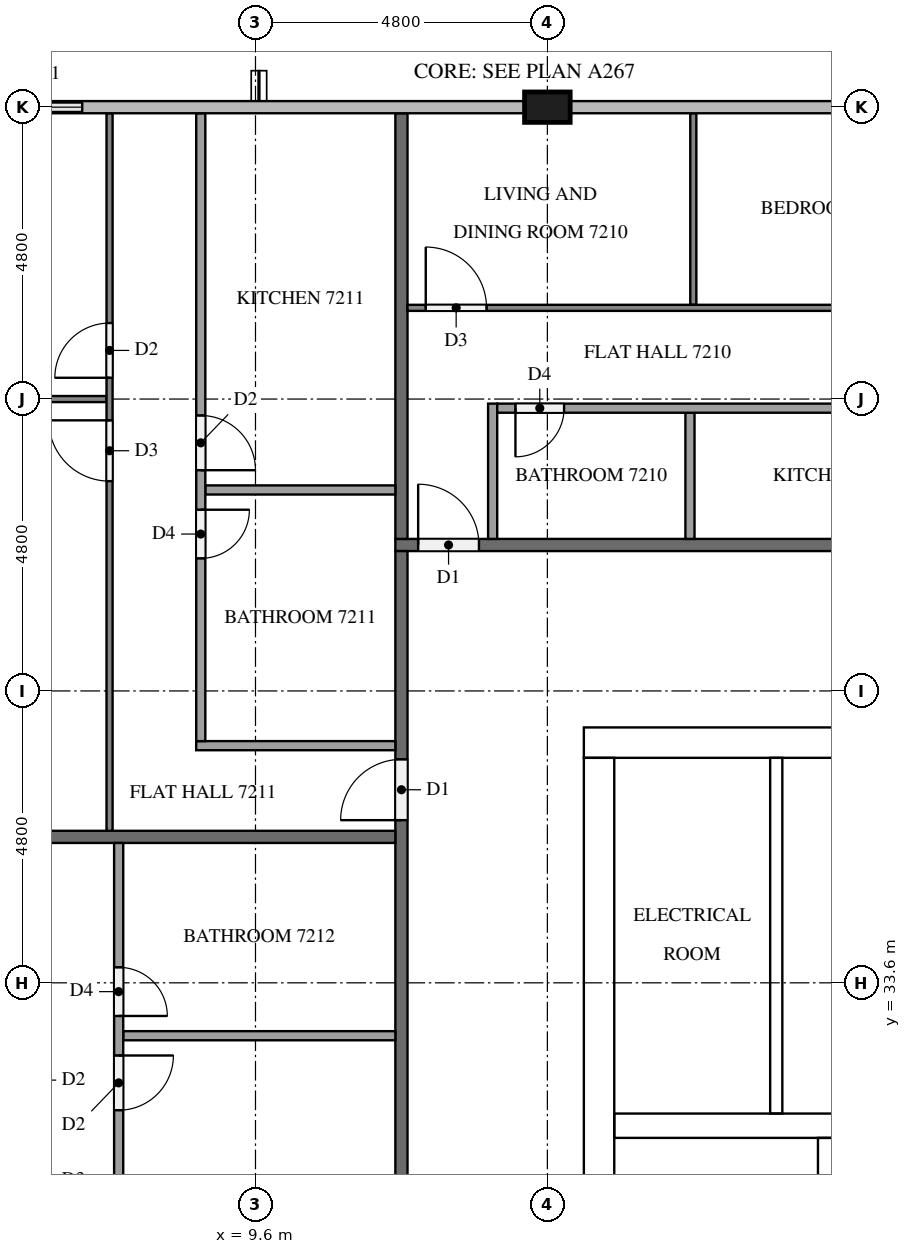
"""IFC4 building model, lengths in metres.
Left out: names, types, materials, properties, quantities, classifications, styles, units other than length and angle.
Written with IfcOpenShell. Run it as: python <this file> out.ifc"""

import sys

from ifc_helpers import new_model, si_unit, direction, frame, frame_2d, origin, origin_2d, place, context, subcontext, project, spatial, rectangle, extrude, element, fill, save


model = new_model("IFC4")
c1 = context("Model", 3, precision=1e-05, world=origin(), true_north=direction((0.0, 1.0)))
c2 = subcontext(c1, "Body", "Model", "MODEL_VIEW")
j1 = project(units=[si_unit("LENGTHUNIT", "METRE"), si_unit("PLANEANGLEUNIT", "RADIAN")], contexts=[c1])
p1 = place(None, origin())
s1 = spatial("IfcSite", under=j1, at=p1, CompositionType="ELEMENT")
p2 = place(p1, origin())
s2 = spatial("IfcBuilding", under=s1, at=p2, CompositionType="ELEMENT")
p3 = place(p2, frame((0.0, 0.0, 275.6)))
s3 = spatial("IfcBuildingStorey", under=s2, at=p3, CompositionType="ELEMENT", Elevation=275.6)
p4 = place(p3, frame((15.0, 37.55, 0.0), z_axis=(0.0, 0.0, 1.0), x_axis=(1.0, 0.0, 0.0)))
e1 = element("IfcWall", 1, at=p4, inside=s3, PredefinedType="SHEAR", context=c2, shape_type="SweptSolid", body=[
    extrude(rectangle(XDim=32.4, YDim=0.5, at=frame_2d((16.2, 0.0))), origin(), (0.0, 0.0, 1.0), 3.2),
])
p5 = place(p4, frame((15.3, 0.0, 0.0)))
e2 = element("IfcOpeningElement", 2, at=p5, cuts=e1, PredefinedType="OPENING", context=c2, shape_type="SweptSolid", body=[
    extrude(rectangle(XDim=1.8, YDim=2.1, at=frame_2d((0.9, 1.05))), frame((0.0, 0.26, 0.0), z_axis=(0.0, -1.0, 0.0), x_axis=(1.0, 0.0, 0.0)), (0.0, 0.0, 1.0), 0.52),
])
p6 = place(p4, frame((1.282, 0.0, 0.0)))
e3 = element("IfcOpeningElement", 3, at=p6, cuts=e1, PredefinedType="OPENING", context=c2, shape_type="SweptSolid", body=[
    extrude(rectangle(XDim=1.0, YDim=2.1, at=frame_2d((0.5, 1.05))), frame((0.0, 0.26, 0.0), z_axis=(0.0, -1.0, 0.0), x_axis=(1.0, 0.0, 0.0)), (0.0, 0.0, 1.0), 0.52),
])
p7 = place(p4, frame((5.082, 0.0, 0.0)))
e4 = element("IfcOpeningElement", 4, at=p7, cuts=e1, PredefinedType="OPENING", context=c2, shape_type="SweptSolid", body=[
    extrude(rectangle(XDim=1.0, YDim=2.1, at=frame_2d((0.5, 1.05))), frame((0.0, 0.26, 0.0), z_axis=(0.0, -1.0, 0.0), x_axis=(1.0, 0.0, 0.0)), (0.0, 0.0, 1.0), 0.52),
])
p8 = place(p3, frame((15.25, 15.5, 0.0), z_axis=(0.0, 0.0, 1.0), x_axis=(0.0, 1.0, 0.0)))
e5 = element("IfcWall", 5, at=p8, inside=s3, PredefinedType="SHEAR", context=c2, shape_type="SweptSolid", body=[
    extrude(rectangle(XDim=21.8, YDim=0.5, at=frame_2d((10.9, 0.0))), origin(), (0.0, 0.0, 1.0), 3.2),
])
p9 = place(p8, frame((5.26, 0.0, 0.0)))
e6 = element("IfcOpeningElement", 6, at=p9, cuts=e5, PredefinedType="OPENING", context=c2, shape_type="SweptSolid", body=[
    extrude(rectangle(XDim=1.2, YDim=2.1, at=frame_2d((0.6, 1.05))), frame((0.0, 0.26, 0.0), z_axis=(0.0, -1.0, 0.0), x_axis=(1.0, 0.0, 0.0)), (0.0, 0.0, 1.0), 0.52),
])
p10 = place(p3, frame((19.05, 15.5, 0.0), z_axis=(0.0, 0.0, 1.0), x_axis=(0.0, 1.0, 0.0)))
e7 = element("IfcWall", 7, at=p10, inside=s3, PredefinedType="SHEAR", context=c2, shape_type="SweptSolid", body=[
    extrude(rectangle(XDim=15.55, YDim=0.4, at=frame_2d((7.775, 0.0))), origin(), (0.0, 0.0, 1.0), 3.2),
])
p11 = place(p10, frame((9.95, 0.0, 0.0)))
e8 = element("IfcOpeningElement", 8, at=p11, cuts=e7, PredefinedType="OPENING", context=c2, shape_type="SweptSolid", body=[
    extrude(rectangle(XDim=1.1, YDim=2.1, at=frame_2d((0.55, 1.05))), frame((0.0, 0.21, 0.0), z_axis=(0.0, -1.0, 0.0), x_axis=(1.0, 0.0, 0.0)), (0.0, 0.0, 1.0), 0.42),
])
p12 = place(p10, frame((13.45, 0.0, 0.0)))
e9 = element("IfcOpeningElement", 9, at=p12, cuts=e7, PredefinedType="OPENING", context=c2, shape_type="SweptSolid", body=[
    extrude(rectangle(XDim=1.1, YDim=2.1, at=frame_2d((0.55, 1.05))), frame((0.0, 0.21, 0.0), z_axis=(0.0, -1.0, 0.0), x_axis=(1.0, 0.0, 0.0)), (0.0, 0.0, 1.0), 0.42),
])
p13 = place(p10, frame((0.7, 0.0, 0.0)))
e10 = element("IfcOpeningElement", 10, at=p13, cuts=e7, PredefinedType="OPENING", context=c2, shape_type="SweptSolid", body=[
    extrude(rectangle(XDim=1.2, YDim=2.1, at=frame_2d((0.6, 1.05))), frame((0.0, 0.21, 0.0), z_axis=(0.0, -1.0, 0.0), x_axis=(1.0, 0.0, 0.0)), (0.0, 0.0, 1.0), 0.42),
])
p14 = place(p3, frame((15.5, 31.25, 0.0), z_axis=(0.0, 0.0, 1.0), x_axis=(1.0, 0.0, 0.0)))
e11 = element("IfcWall", 11, at=p14, inside=s3, PredefinedType="SHEAR", context=c2, shape_type="SweptSolid", body=[
    extrude(rectangle(XDim=7.4, YDim=0.4, at=frame_2d((3.7, 0.0))), origin(), (0.0, 0.0, 1.0), 3.2),
])
p15 = place(p3, frame((14.4, 48.0, 0.0), z_axis=(0.0, 0.0, 1.0), x_axis=(1.0, 0.0, 0.0)))
e12 = element("IfcColumn", 12, at=p15, inside=s3, PredefinedType="COLUMN", context=c2, shape_type="SweptSolid", body=[
    extrude(rectangle(XDim=0.75, YDim=0.5, at=origin_2d()), origin(), (0.0, 0.0, 1.0), 3.2),
])
p16 = place(p3, frame((7.2, 48.0, 0.0), z_axis=(0.0, 0.0, 1.0), x_axis=(-1.0, 0.0, 0.0)))
e13 = element("IfcWall", 13, at=p16, inside=s3, PredefinedType="SOLIDWALL", context=c2, shape_type="SweptSolid", body=[
    extrude(rectangle(XDim=2.1, YDim=0.15, at=frame_2d((1.05, 0.0))), origin(), (0.0, 0.0, 1.0), 3.2),
])
p17 = place(p16, frame((0.45, 0.0, 0.9)))
e14 = element("IfcOpeningElement", 14, at=p17, cuts=e13, PredefinedType="OPENING", context=c2, shape_type="SweptSolid", body=[
    extrude(rectangle(XDim=1.2, YDim=1.4, at=frame_2d((0.6, 0.7))), frame((0.0, 0.085, 0.0), z_axis=(0.0, -1.0, 0.0), x_axis=(1.0, 0.0, 0.0)), (0.0, 0.0, 1.0), 0.17),
])
p18 = place(p3, frame((18.164, 31.45, 0.0), z_axis=(0.0, 0.0, 1.0), x_axis=(0.0, 1.0, 0.0)))
e15 = element("IfcWall", 15, at=p18, inside=s3, PredefinedType="PARTITIONING", context=c2, shape_type="SweptSolid", body=[
    extrude(rectangle(XDim=5.85, YDim=0.2, at=frame_2d((2.925, 0.0))), origin(), (0.0, 0.0, 1.0), 3.2),
])
p19 = place(p3, frame((11.9, 40.8, 0.0), z_axis=(0.0, 0.0, 1.0), x_axis=(1.0, 0.0, 0.0)))
e16 = element("IfcWall", 16, at=p19, inside=s3, PredefinedType="PARTITIONING", context=c2, shape_type="SweptSolid", body=[
    extrude(rectangle(XDim=38.6, YDim=0.2, at=frame_2d((19.3, 0.0))), origin(), (0.0, 0.0, 1.0), 3.2),
])
p20 = place(p19, frame((31.575, 0.0, 0.0)))
e17 = element("IfcOpeningElement", 17, at=p20, cuts=e16, PredefinedType="OPENING", context=c2, shape_type="SweptSolid", body=[
    extrude(rectangle(XDim=1.0, YDim=2.1, at=frame_2d((0.5, 1.05))), frame((0.0, 0.11, 0.0), z_axis=(0.0, -1.0, 0.0), x_axis=(1.0, 0.0, 0.0)), (0.0, 0.0, 1.0), 0.22),
])
p21 = place(p19, frame((24.375, 0.0, 0.0)))
e18 = element("IfcOpeningElement", 18, at=p21, cuts=e16, PredefinedType="OPENING", context=c2, shape_type="SweptSolid", body=[
    extrude(rectangle(XDim=1.0, YDim=2.1, at=frame_2d((0.5, 1.05))), frame((0.0, 0.11, 0.0), z_axis=(0.0, -1.0, 0.0), x_axis=(1.0, 0.0, 0.0)), (0.0, 0.0, 1.0), 0.22),
])
p22 = place(p19, frame((22.825, 0.0, 0.0)))
e19 = element("IfcOpeningElement", 19, at=p22, cuts=e16, PredefinedType="OPENING", context=c2, shape_type="SweptSolid", body=[
    extrude(rectangle(XDim=1.0, YDim=2.1, at=frame_2d((0.5, 1.05))), frame((0.0, 0.11, 0.0), z_axis=(0.0, -1.0, 0.0), x_axis=(1.0, 0.0, 0.0)), (0.0, 0.0, 1.0), 0.22),
])
p23 = place(p19, frame((0.375, 0.0, 0.0)))
e20 = element("IfcOpeningElement", 20, at=p23, cuts=e16, PredefinedType="OPENING", context=c2, shape_type="SweptSolid", body=[
    extrude(rectangle(XDim=1.0, YDim=2.1, at=frame_2d((0.5, 1.05))), frame((0.0, 0.11, 0.0), z_axis=(0.0, -1.0, 0.0), x_axis=(1.0, 0.0, 0.0)), (0.0, 0.0, 1.0), 0.22),
])
p24 = place(p3, frame((12.0, 12.1, 0.0), z_axis=(0.0, 0.0, 1.0), x_axis=(0.0, 1.0, 0.0)))
e21 = element("IfcWall", 21, at=p24, inside=s3, PredefinedType="PARTITIONING", context=c2, shape_type="SweptSolid", body=[
    extrude(rectangle(XDim=28.6, YDim=0.2, at=frame_2d((14.3, 0.0))), origin(), (0.0, 0.0, 1.0), 3.2),
])
p25 = place(p24, frame((24.175, 0.0, 0.0)))
e22 = element("IfcOpeningElement", 22, at=p25, cuts=e21, PredefinedType="OPENING", context=c2, shape_type="SweptSolid", body=[
    extrude(rectangle(XDim=1.0, YDim=2.1, at=frame_2d((0.5, 1.05))), frame((0.0, 0.11, 0.0), z_axis=(0.0, -1.0, 0.0), x_axis=(1.0, 0.0, 0.0)), (0.0, 0.0, 1.0), 0.22),
])
p26 = place(p24, frame((14.575, 0.0, 0.0)))
e23 = element("IfcOpeningElement", 23, at=p26, cuts=e21, PredefinedType="OPENING", context=c2, shape_type="SweptSolid", body=[
    extrude(rectangle(XDim=1.0, YDim=2.1, at=frame_2d((0.5, 1.05))), frame((0.0, 0.11, 0.0), z_axis=(0.0, -1.0, 0.0), x_axis=(1.0, 0.0, 0.0)), (0.0, 0.0, 1.0), 0.22),
])
p27 = place(p24, frame((0.175, 0.0, 0.0)))
e24 = element("IfcOpeningElement", 24, at=p27, cuts=e21, PredefinedType="OPENING", context=c2, shape_type="SweptSolid", body=[
    extrude(rectangle(XDim=1.0, YDim=2.1, at=frame_2d((0.5, 1.05))), frame((0.0, 0.11, 0.0), z_axis=(0.0, -1.0, 0.0), x_axis=(1.0, 0.0, 0.0)), (0.0, 0.0, 1.0), 0.22),
])
p28 = place(p3, frame((12.0, 47.9, 0.0), z_axis=(0.0, 0.0, 1.0), x_axis=(0.0, -1.0, 0.0)))
e25 = element("IfcWall", 25, at=p28, inside=s3, PredefinedType="PARTITIONING", context=c2, shape_type="SweptSolid", body=[
    extrude(rectangle(XDim=7.0, YDim=0.2, at=frame_2d((3.5, 0.0))), origin(), (0.0, 0.0, 1.0), 3.2),
])
p29 = place(p3, frame((0.1, 36.0, 0.0), z_axis=(0.0, 0.0, 1.0), x_axis=(1.0, 0.0, 0.0)))
e26 = element("IfcWall", 26, at=p29, inside=s3, PredefinedType="PARTITIONING", context=c2, shape_type="SweptSolid", body=[
    extrude(rectangle(XDim=11.8, YDim=0.2, at=frame_2d((5.9, 0.0))), origin(), (0.0, 0.0, 1.0), 3.2),
])
p30 = place(p3, frame((16.8, 44.75, 0.0), z_axis=(0.0, 0.0, 1.0), x_axis=(0.0, 1.0, 0.0)))
e27 = element("IfcWall", 27, at=p30, inside=s3, PredefinedType="PARTITIONING", context=c2, shape_type="SweptSolid", body=[
    extrude(rectangle(XDim=3.15, YDim=0.1, at=frame_2d((1.575, 0.0))), origin(), (0.0, 0.0, 1.0), 3.2),
])
p31 = place(p3, frame((12.1, 44.7, 0.0), z_axis=(0.0, 0.0, 1.0), x_axis=(1.0, 0.0, 0.0)))
e28 = element("IfcWall", 28, at=p31, inside=s3, PredefinedType="PARTITIONING", context=c2, shape_type="SweptSolid", body=[
    extrude(rectangle(XDim=9.4, YDim=0.1, at=frame_2d((4.7, 0.0))), origin(), (0.0, 0.0, 1.0), 3.2),
])
p32 = place(p31, frame((0.3, 0.0, 0.0)))
e29 = element("IfcOpeningElement", 29, at=p32, cuts=e28, PredefinedType="OPENING", context=c2, shape_type="SweptSolid", body=[
    extrude(rectangle(XDim=1.0, YDim=2.1, at=frame_2d((0.5, 1.05))), frame((0.0, 0.06, 0.0), z_axis=(0.0, -1.0, 0.0), x_axis=(1.0, 0.0, 0.0)), (0.0, 0.0, 1.0), 0.12),
])
p33 = place(p31, frame((8.2, 0.0, 0.0)))
e30 = element("IfcOpeningElement", 30, at=p33, cuts=e28, PredefinedType="OPENING", context=c2, shape_type="SweptSolid", body=[
    extrude(rectangle(XDim=0.9, YDim=2.1, at=frame_2d((0.45, 1.05))), frame((0.0, 0.06, 0.0), z_axis=(0.0, -1.0, 0.0), x_axis=(1.0, 0.0, 0.0)), (0.0, 0.0, 1.0), 0.12),
])
p34 = place(p3, frame((16.745, 40.9, 0.0), z_axis=(0.0, 0.0, 1.0), x_axis=(0.0, 1.0, 0.0)))
e31 = element("IfcWall", 31, at=p34, inside=s3, PredefinedType="PARTITIONING", context=c2, shape_type="SweptSolid", body=[
    extrude(rectangle(XDim=2.075, YDim=0.15, at=frame_2d((1.038, 0.0))), origin(), (0.0, 0.0, 1.0), 3.2),
])
p35 = place(p3, frame((13.5, 40.9, 0.0), z_axis=(0.0, 0.0, 1.0), x_axis=(0.0, 1.0, 0.0)))
e32 = element("IfcWall", 32, at=p35, inside=s3, PredefinedType="PARTITIONING", context=c2, shape_type="SweptSolid", body=[
    extrude(rectangle(XDim=2.225, YDim=0.15, at=frame_2d((1.113, 0.0))), origin(), (0.0, 0.0, 1.0), 3.2),
])
p36 = place(p3, frame((21.5, 43.05, 0.0), z_axis=(0.0, 0.0, 1.0), x_axis=(-1.0, 0.0, 0.0)))
e33 = element("IfcWall", 33, at=p36, inside=s3, PredefinedType="PARTITIONING", context=c2, shape_type="SweptSolid", body=[
    extrude(rectangle(XDim=7.925, YDim=0.15, at=frame_2d((3.962, 0.0))), origin(), (0.0, 0.0, 1.0), 3.2),
])
p37 = place(p36, frame((6.825, 0.0, 0.0)))
e34 = element("IfcOpeningElement", 34, at=p37, cuts=e33, PredefinedType="OPENING", context=c2, shape_type="SweptSolid", body=[
    extrude(rectangle(XDim=0.8, YDim=2.1, at=frame_2d((0.4, 1.05))), frame((0.0, 0.085, 0.0), z_axis=(0.0, -1.0, 0.0), x_axis=(1.0, 0.0, 0.0)), (0.0, 0.0, 1.0), 0.17),
])
p38 = place(p36, frame((0.35, 0.0, 0.0)))
e35 = element("IfcOpeningElement", 35, at=p38, cuts=e33, PredefinedType="OPENING", context=c2, shape_type="SweptSolid", body=[
    extrude(rectangle(XDim=0.9, YDim=2.1, at=frame_2d((0.45, 1.05))), frame((0.0, 0.085, 0.0), z_axis=(0.0, -1.0, 0.0), x_axis=(1.0, 0.0, 0.0)), (0.0, 0.0, 1.0), 0.17),
])
p39 = place(p3, frame((7.15, 43.2, 0.0), z_axis=(0.0, 0.0, 1.0), x_axis=(-1.0, 0.0, 0.0)))
e36 = element("IfcWall", 36, at=p39, inside=s3, PredefinedType="PARTITIONING", context=c2, shape_type="SweptSolid", body=[
    extrude(rectangle(XDim=6.85, YDim=0.1, at=frame_2d((3.425, 0.0))), origin(), (0.0, 0.0, 1.0), 3.2),
])
p40 = place(p3, frame((7.2, 36.1, 0.0), z_axis=(0.0, 0.0, 1.0), x_axis=(0.0, 1.0, 0.0)))
e37 = element("IfcWall", 37, at=p40, inside=s3, PredefinedType="PARTITIONING", context=c2, shape_type="SweptSolid", body=[
    extrude(rectangle(XDim=11.8, YDim=0.1, at=frame_2d((5.9, 0.0))), origin(), (0.0, 0.0, 1.0), 3.2),
])
p41 = place(p40, frame((5.75, 0.0, 0.0)))
e38 = element("IfcOpeningElement", 38, at=p41, cuts=e37, PredefinedType="OPENING", context=c2, shape_type="SweptSolid", body=[
    extrude(rectangle(XDim=1.0, YDim=2.1, at=frame_2d((0.5, 1.05))), frame((0.0, 0.06, 0.0), z_axis=(0.0, -1.0, 0.0), x_axis=(1.0, 0.0, 0.0)), (0.0, 0.0, 1.0), 0.12),
])
p42 = place(p40, frame((7.45, 0.0, 0.0)))
e39 = element("IfcOpeningElement", 39, at=p42, cuts=e37, PredefinedType="OPENING", context=c2, shape_type="SweptSolid", body=[
    extrude(rectangle(XDim=0.9, YDim=2.1, at=frame_2d((0.45, 1.05))), frame((0.0, 0.06, 0.0), z_axis=(0.0, -1.0, 0.0), x_axis=(1.0, 0.0, 0.0)), (0.0, 0.0, 1.0), 0.12),
])
p43 = place(p3, frame((11.9, 41.705, 0.0), z_axis=(0.0, 0.0, 1.0), x_axis=(-1.0, 0.0, 0.0)))
e40 = element("IfcWall", 40, at=p43, inside=s3, PredefinedType="PARTITIONING", context=c2, shape_type="SweptSolid", body=[
    extrude(rectangle(XDim=3.125, YDim=0.15, at=frame_2d((1.562, 0.0))), origin(), (0.0, 0.0, 1.0), 3.2),
])
p44 = place(p3, frame((11.9, 37.5, 0.0), z_axis=(0.0, 0.0, 1.0), x_axis=(-1.0, 0.0, 0.0)))
e41 = element("IfcWall", 41, at=p44, inside=s3, PredefinedType="PARTITIONING", context=c2, shape_type="SweptSolid", body=[
    extrude(rectangle(XDim=3.275, YDim=0.15, at=frame_2d((1.637, 0.0))), origin(), (0.0, 0.0, 1.0), 3.2),
])
p45 = place(p3, frame((8.7, 47.9, 0.0), z_axis=(0.0, 0.0, 1.0), x_axis=(0.0, -1.0, 0.0)))
e42 = element("IfcWall", 42, at=p45, inside=s3, PredefinedType="PARTITIONING", context=c2, shape_type="SweptSolid", body=[
    extrude(rectangle(XDim=10.325, YDim=0.15, at=frame_2d((5.163, 0.0))), origin(), (0.0, 0.0, 1.0), 3.2),
])
p46 = place(p45, frame((6.52, 0.0, 0.0)))
e43 = element("IfcOpeningElement", 43, at=p46, cuts=e42, PredefinedType="OPENING", context=c2, shape_type="SweptSolid", body=[
    extrude(rectangle(XDim=0.8, YDim=2.1, at=frame_2d((0.4, 1.05))), frame((0.0, 0.085, 0.0), z_axis=(0.0, -1.0, 0.0), x_axis=(1.0, 0.0, 0.0)), (0.0, 0.0, 1.0), 0.17),
])
p47 = place(p45, frame((4.97, 0.0, 0.0)))
e44 = element("IfcOpeningElement", 44, at=p47, cuts=e42, PredefinedType="OPENING", context=c2, shape_type="SweptSolid", body=[
    extrude(rectangle(XDim=0.9, YDim=2.1, at=frame_2d((0.45, 1.05))), frame((0.0, 0.085, 0.0), z_axis=(0.0, -1.0, 0.0), x_axis=(1.0, 0.0, 0.0)), (0.0, 0.0, 1.0), 0.17),
])
p48 = place(p3, frame((11.9, 32.73, 0.0), z_axis=(0.0, 0.0, 1.0), x_axis=(-1.0, 0.0, 0.0)))
e45 = element("IfcWall", 45, at=p48, inside=s3, PredefinedType="PARTITIONING", context=c2, shape_type="SweptSolid", body=[
    extrude(rectangle(XDim=4.475, YDim=0.15, at=frame_2d((2.237, 0.0))), origin(), (0.0, 0.0, 1.0), 3.2),
])
p49 = place(p3, frame((7.35, 35.9, 0.0), z_axis=(0.0, 0.0, 1.0), x_axis=(0.0, -1.0, 0.0)))
e46 = element("IfcWall", 46, at=p49, inside=s3, PredefinedType="PARTITIONING", context=c2, shape_type="SweptSolid", body=[
    extrude(rectangle(XDim=7.925, YDim=0.15, at=frame_2d((3.962, 0.0))), origin(), (0.0, 0.0, 1.0), 3.2),
])
p50 = place(p49, frame((3.495, 0.0, 0.0)))
e47 = element("IfcOpeningElement", 47, at=p50, cuts=e46, PredefinedType="OPENING", context=c2, shape_type="SweptSolid", body=[
    extrude(rectangle(XDim=0.9, YDim=2.1, at=frame_2d((0.45, 1.05))), frame((0.0, 0.085, 0.0), z_axis=(0.0, -1.0, 0.0), x_axis=(1.0, 0.0, 0.0)), (0.0, 0.0, 1.0), 0.17),
])
p51 = place(p49, frame((2.045, 0.0, 0.0)))
e48 = element("IfcOpeningElement", 48, at=p51, cuts=e46, PredefinedType="OPENING", context=c2, shape_type="SweptSolid", body=[
    extrude(rectangle(XDim=0.8, YDim=2.1, at=frame_2d((0.4, 1.05))), frame((0.0, 0.085, 0.0), z_axis=(0.0, -1.0, 0.0), x_axis=(1.0, 0.0, 0.0)), (0.0, 0.0, 1.0), 0.17),
])
p52 = place(p17, origin())
e49 = element("IfcWindow", 49, at=p52, inside=s3, PartitioningType="SINGLE_PANEL", PredefinedType="WINDOW", context=c2, shape_type="SweptSolid", body=[
    extrude(rectangle(XDim=1.2, YDim=1.4, at=frame_2d((0.6, 0.7))), frame((0.0, 0.03, 0.0), z_axis=(0.0, -1.0, 0.0), x_axis=(1.0, 0.0, 0.0)), (0.0, 0.0, 1.0), 0.06),
])
fill(e14, e49)
p53 = place(p6, origin())
e50 = element("IfcDoor", 50, at=p53, inside=s3, OperationType="SINGLE_SWING_LEFT", PredefinedType="DOOR", context=c2, shape_type="SweptSolid", body=[
    extrude(rectangle(XDim=1.0, YDim=2.1, at=frame_2d((0.5, 1.05))), frame((0.0, 0.025, 0.0), z_axis=(0.0, -1.0, 0.0), x_axis=(1.0, 0.0, 0.0)), (0.0, 0.0, 1.0), 0.05),
])
fill(e3, e50)
p54 = place(p23, origin())
e51 = element("IfcDoor", 51, at=p54, inside=s3, OperationType="SINGLE_SWING_LEFT", PredefinedType="DOOR", context=c2, shape_type="SweptSolid", body=[
    extrude(rectangle(XDim=1.0, YDim=2.1, at=frame_2d((0.5, 1.05))), frame((0.0, 0.025, 0.0), z_axis=(0.0, -1.0, 0.0), x_axis=(1.0, 0.0, 0.0)), (0.0, 0.0, 1.0), 0.05),
])
fill(e20, e51)
p55 = place(p25, origin())
e52 = element("IfcDoor", 52, at=p55, inside=s3, OperationType="SINGLE_SWING_LEFT", PredefinedType="DOOR", context=c2, shape_type="SweptSolid", body=[
    extrude(rectangle(XDim=1.0, YDim=2.1, at=frame_2d((0.5, 1.05))), frame((0.0, 0.025, 0.0), z_axis=(0.0, -1.0, 0.0), x_axis=(1.0, 0.0, 0.0)), (0.0, 0.0, 1.0), 0.05),
])
fill(e22, e52)
p56 = place(p32, origin())
e53 = element("IfcDoor", 53, at=p56, inside=s3, OperationType="SINGLE_SWING_LEFT", PredefinedType="DOOR", context=c2, shape_type="SweptSolid", body=[
    extrude(rectangle(XDim=1.0, YDim=2.1, at=frame_2d((0.5, 1.05))), frame((0.0, 0.025, 0.0), z_axis=(0.0, -1.0, 0.0), x_axis=(1.0, 0.0, 0.0)), (0.0, 0.0, 1.0), 0.05),
])
fill(e29, e53)
p57 = place(p37, origin())
e54 = element("IfcDoor", 54, at=p57, inside=s3, OperationType="SINGLE_SWING_RIGHT", PredefinedType="DOOR", context=c2, shape_type="SweptSolid", body=[
    extrude(rectangle(XDim=0.8, YDim=2.1, at=frame_2d((0.4, 1.05))), frame((0.0, 0.025, 0.0), z_axis=(0.0, -1.0, 0.0), x_axis=(1.0, 0.0, 0.0)), (0.0, 0.0, 1.0), 0.05),
])
fill(e34, e54)
p58 = place(p41, origin())
e55 = element("IfcDoor", 55, at=p58, inside=s3, OperationType="SINGLE_SWING_RIGHT", PredefinedType="DOOR", context=c2, shape_type="SweptSolid", body=[
    extrude(rectangle(XDim=1.0, YDim=2.1, at=frame_2d((0.5, 1.05))), frame((0.0, 0.025, 0.0), z_axis=(0.0, -1.0, 0.0), x_axis=(1.0, 0.0, 0.0)), (0.0, 0.0, 1.0), 0.05),
])
fill(e38, e55)
p59 = place(p42, origin())
e56 = element("IfcDoor", 56, at=p59, inside=s3, OperationType="SINGLE_SWING_LEFT", PredefinedType="DOOR", context=c2, shape_type="SweptSolid", body=[
    extrude(rectangle(XDim=0.9, YDim=2.1, at=frame_2d((0.45, 1.05))), frame((0.0, 0.025, 0.0), z_axis=(0.0, -1.0, 0.0), x_axis=(1.0, 0.0, 0.0)), (0.0, 0.0, 1.0), 0.05),
])
fill(e39, e56)
p60 = place(p46, origin())
e57 = element("IfcDoor", 57, at=p60, inside=s3, OperationType="SINGLE_SWING_LEFT", PredefinedType="DOOR", context=c2, shape_type="SweptSolid", body=[
    extrude(rectangle(XDim=0.8, YDim=2.1, at=frame_2d((0.4, 1.05))), frame((0.0, 0.025, 0.0), z_axis=(0.0, -1.0, 0.0), x_axis=(1.0, 0.0, 0.0)), (0.0, 0.0, 1.0), 0.05),
])
fill(e43, e57)
p61 = place(p47, origin())
e58 = element("IfcDoor", 58, at=p61, inside=s3, OperationType="SINGLE_SWING_RIGHT", PredefinedType="DOOR", context=c2, shape_type="SweptSolid", body=[
    extrude(rectangle(XDim=0.9, YDim=2.1, at=frame_2d((0.45, 1.05))), frame((0.0, 0.025, 0.0), z_axis=(0.0, -1.0, 0.0), x_axis=(1.0, 0.0, 0.0)), (0.0, 0.0, 1.0), 0.05),
])
fill(e44, e58)
p62 = place(p50, origin())
e59 = element("IfcDoor", 59, at=p62, inside=s3, OperationType="SINGLE_SWING_LEFT", PredefinedType="DOOR", context=c2, shape_type="SweptSolid", body=[
    extrude(rectangle(XDim=0.9, YDim=2.1, at=frame_2d((0.45, 1.05))), frame((0.0, 0.025, 0.0), z_axis=(0.0, -1.0, 0.0), x_axis=(1.0, 0.0, 0.0)), (0.0, 0.0, 1.0), 0.05),
])
fill(e47, e59)
p63 = place(p51, origin())
e60 = element("IfcDoor", 60, at=p63, inside=s3, OperationType="SINGLE_SWING_RIGHT", PredefinedType="DOOR", context=c2, shape_type="SweptSolid", body=[
    extrude(rectangle(XDim=0.8, YDim=2.1, at=frame_2d((0.4, 1.05))), frame((0.0, 0.025, 0.0), z_axis=(0.0, -1.0, 0.0), x_axis=(1.0, 0.0, 0.0)), (0.0, 0.0, 1.0), 0.05),
])
fill(e48, e60)
save(model, sys.argv[1])
